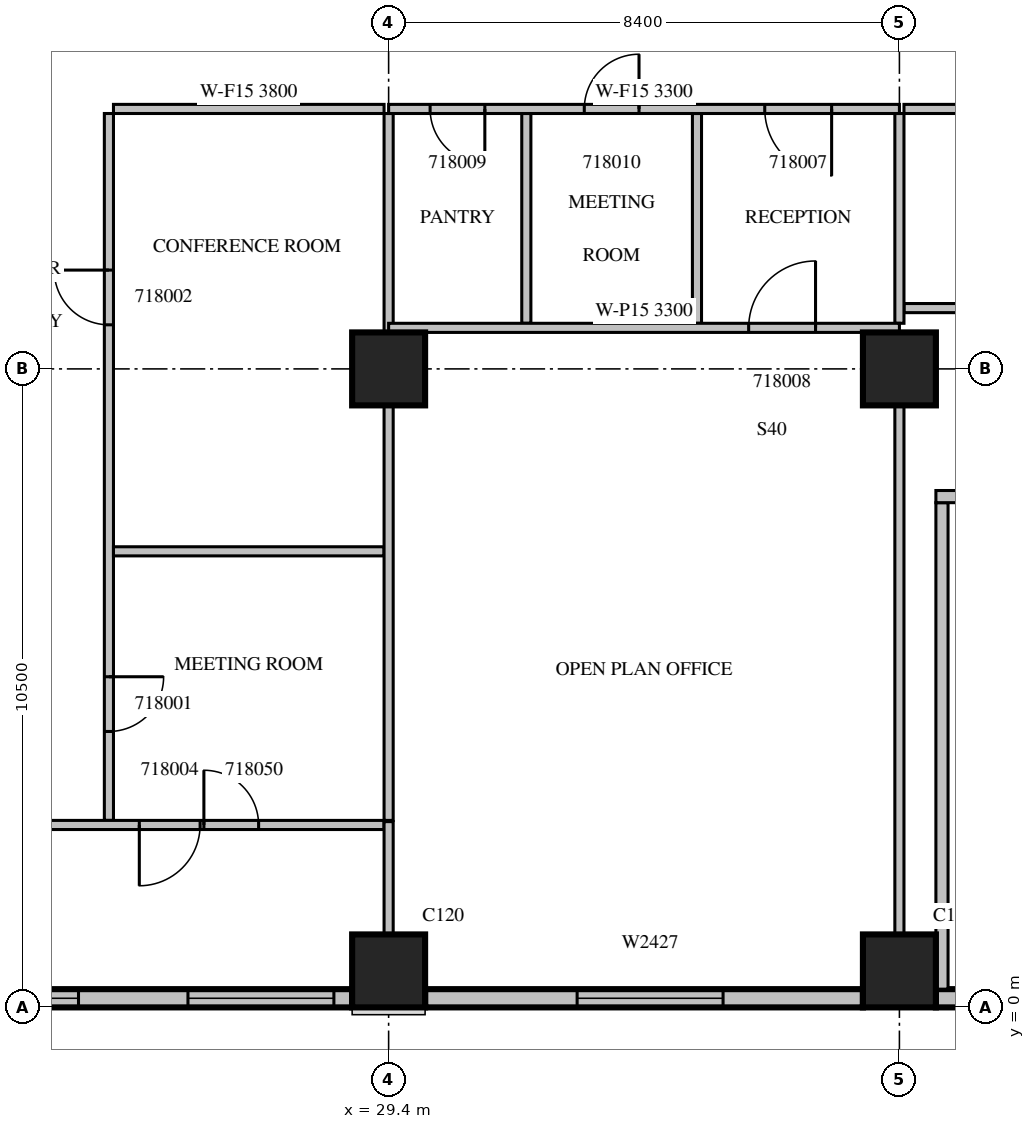
"""IFC4 building model, lengths in metres.
Left out: names, types, materials, properties, quantities, classifications, styles, units other than length and angle.
Written with IfcOpenShell. Run it as: python <this file> out.ifc"""

import sys

from ifc_helpers import new_model, si_unit, direction, frame, frame_2d, origin, origin_2d, place, context, subcontext, project, spatial, rectangle, extrude, source, transform, mapped, element, fill, save


model = new_model("IFC4")
c1 = context("Model", 3, precision=1e-05, world=origin(), true_north=direction((0.0, 1.0)))
c2 = subcontext(c1, "Body", "Model", "MODEL_VIEW")
j1 = project(units=[si_unit("LENGTHUNIT", "METRE"), si_unit("PLANEANGLEUNIT", "RADIAN")], contexts=[c1])
p1 = place(None, origin())
s1 = spatial("IfcSite", under=j1, at=p1, CompositionType="ELEMENT")
p2 = place(p1, origin())
s2 = spatial("IfcBuilding", under=s1, at=p2, CompositionType="ELEMENT")
p3 = place(p2, frame((0.0, 0.0, 86.7)))
s3 = spatial("IfcBuildingStorey", under=s2, at=p3, CompositionType="ELEMENT", Elevation=86.7)
m1 = source(origin(), c2, "Body", "SweptSolid", [
    extrude(rectangle(XDim=1.2, YDim=1.2, at=origin_2d()), origin(), (0.0, 0.0, 1.0), 4.2),
])
for number, where, z_axis, x_axis in (
    (1, (29.4, 0.6, 0.0), (0.0, 0.0, 1.0), (1.0, 0.0, 0.0)),
    (2, (37.8, 0.6, 0.0), (0.0, 0.0, 1.0), (1.0, 0.0, 0.0)),
    (3, (29.4, 10.5, 0.0), (0.0, 0.0, 1.0), (1.0, 0.0, 0.0)),
    (4, (37.8, 10.5, 0.0), (0.0, 0.0, 1.0), (1.0, 0.0, 0.0)),
):
    element("IfcColumn", number, at=place(p3, frame(where, z_axis=z_axis, x_axis=x_axis)), inside=s3, PredefinedType="COLUMN", context=c2, shape_type="MappedRepresentation", body=[
        mapped(m1, transform((0.0, 0.0, 0.0), scale=1.0)),
    ])
m2 = source(origin(), c2, "Body", "SweptSolid", [
    extrude(rectangle(XDim=7.2, YDim=0.3, at=frame_2d((3.6, 0.0))), origin(), (0.0, 0.0, 1.0), 3.8),
])
p4 = place(p3, frame((21.6, 0.15, 0.0), z_axis=(0.0, 0.0, 1.0), x_axis=(1.0, 0.0, 0.0)))
e5 = element("IfcWall", 5, at=p4, inside=s3, PredefinedType="STANDARD", context=c2, shape_type="MappedRepresentation", body=[
    mapped(m2, transform((0.0, 0.0, 0.0), scale=1.0)),
])
m3 = source(origin(), c2, "Body", "SweptSolid", [
    extrude(rectangle(XDim=2.4, YDim=2.7, at=frame_2d((1.2, 1.35))), frame((0.0, 0.16, 0.0), z_axis=(0.0, -1.0, 0.0), x_axis=(1.0, 0.0, 0.0)), (0.0, 0.0, 1.0), 0.32),
])
p5 = place(p4, frame((0.3, 0.0, 0.6)))
e6 = element("IfcOpeningElement", 6, at=p5, cuts=e5, PredefinedType="OPENING", context=c2, shape_type="MappedRepresentation", body=[
    mapped(m3, transform((0.0, 0.0, 0.0), scale=1.0)),
])
p6 = place(p4, frame((4.5, 0.0, 0.6)))
e7 = element("IfcOpeningElement", 7, at=p6, cuts=e5, PredefinedType="OPENING", context=c2, shape_type="MappedRepresentation", body=[
    mapped(m3, transform((0.0, 0.0, 0.0), scale=1.0)),
])
p7 = place(p3, frame((30.0, 0.15, 0.0), z_axis=(0.0, 0.0, 1.0), x_axis=(1.0, 0.0, 0.0)))
e8 = element("IfcWall", 8, at=p7, inside=s3, PredefinedType="STANDARD", context=c2, shape_type="MappedRepresentation", body=[
    mapped(m2, transform((0.0, 0.0, 0.0), scale=1.0)),
])
p8 = place(p7, frame((2.5, 0.0, 0.6)))
e9 = element("IfcOpeningElement", 9, at=p8, cuts=e8, PredefinedType="OPENING", context=c2, shape_type="MappedRepresentation", body=[
    mapped(m3, transform((0.0, 0.0, 0.0), scale=1.0)),
])
m4 = source(origin(), c2, "Body", "SweptSolid", [
    extrude(rectangle(XDim=1.8, YDim=0.3, at=frame_2d((0.9, 0.0))), origin(), (0.0, 0.0, 1.0), 3.8),
])
p9 = place(p3, frame((38.4, 0.15, 0.0), z_axis=(0.0, 0.0, 1.0), x_axis=(1.0, 0.0, 0.0)))
e10 = element("IfcWall", 10, at=p9, inside=s3, PredefinedType="STANDARD", context=c2, shape_type="MappedRepresentation", body=[
    mapped(m4, transform((0.0, 0.0, 0.0), scale=1.0)),
])
m5 = source(origin(), c2, "Body", "SweptSolid", [
    extrude(rectangle(XDim=8.0, YDim=0.2, at=frame_2d((4.0, 0.0))), origin(), (0.0, 0.0, 1.0), 3.8),
])
p10 = place(p3, frame((38.5, 0.3, 0.0), z_axis=(0.0, 0.0, 1.0), x_axis=(0.0, 1.0, 0.0)))
e11 = element("IfcWall", 11, at=p10, inside=s3, PredefinedType="PARTITIONING", context=c2, shape_type="MappedRepresentation", body=[
    mapped(m5, transform((0.0, 0.0, 0.0), scale=1.0)),
])
m6 = source(origin(), c2, "Body", "SweptSolid", [
    extrude(rectangle(XDim=5.45, YDim=0.2, at=frame_2d((2.725, 0.0))), origin(), (0.0, 0.0, 1.0), 3.8),
])
p11 = place(p3, frame((38.4, 8.4, 0.0), z_axis=(0.0, 0.0, 1.0), x_axis=(1.0, 0.0, 0.0)))
e12 = element("IfcWall", 12, at=p11, inside=s3, PredefinedType="PARTITIONING", context=c2, shape_type="MappedRepresentation", body=[
    mapped(m6, transform((0.0, 0.0, 0.0), scale=1.0)),
])
m7 = source(origin(), c2, "Body", "SweptSolid", [
    extrude(rectangle(XDim=1.2, YDim=2.1, at=frame_2d((0.6, 1.05))), frame((0.0, 0.11, 0.0), z_axis=(0.0, -1.0, 0.0), x_axis=(1.0, 0.0, 0.0)), (0.0, 0.0, 1.0), 0.22),
])
p12 = place(p11, frame((0.4, 0.0, 0.0)))
e13 = element("IfcOpeningElement", 13, at=p12, cuts=e12, PredefinedType="OPENING", context=c2, shape_type="MappedRepresentation", body=[
    mapped(m7, transform((0.0, 0.0, 0.0), scale=1.0)),
])
m8 = source(origin(), c2, "Body", "SweptSolid", [
    extrude(rectangle(XDim=0.9, YDim=2.1, at=frame_2d((0.45, 1.05))), frame((0.0, 0.11, 0.0), z_axis=(0.0, -1.0, 0.0), x_axis=(1.0, 0.0, 0.0)), (0.0, 0.0, 1.0), 0.22),
])
p13 = place(p11, frame((3.25, 0.0, 0.0)))
e14 = element("IfcOpeningElement", 14, at=p13, cuts=e12, PredefinedType="OPENING", context=c2, shape_type="MappedRepresentation", body=[
    mapped(m8, transform((0.0, 0.0, 0.0), scale=1.0)),
])
m9 = source(origin(), c2, "Body", "SweptSolid", [
    extrude(rectangle(XDim=11.625, YDim=0.15, at=frame_2d((5.812, 0.0))), origin(), (0.0, 0.0, 1.0), 3.8),
])
p14 = place(p3, frame((24.8, 14.7, 0.0), z_axis=(0.0, 0.0, 1.0), x_axis=(0.0, -1.0, 0.0)))
e15 = element("IfcWall", 15, at=p14, inside=s3, PredefinedType="PARTITIONING", context=c2, shape_type="MappedRepresentation", body=[
    mapped(m9, transform((0.0, 0.0, 0.0), scale=1.0)),
])
m10 = source(origin(), c2, "Body", "SweptSolid", [
    extrude(rectangle(XDim=0.9, YDim=2.1, at=frame_2d((0.45, 1.05))), frame((0.0, 0.085, 0.0), z_axis=(0.0, -1.0, 0.0), x_axis=(1.0, 0.0, 0.0)), (0.0, 0.0, 1.0), 0.17),
])
p15 = place(p14, frame((9.262, 0.0, 0.0)))
e16 = element("IfcOpeningElement", 16, at=p15, cuts=e15, PredefinedType="OPENING", context=c2, shape_type="MappedRepresentation", body=[
    mapped(m10, transform((0.0, 0.0, 0.0), scale=1.0)),
])
p16 = place(p14, frame((2.575, 0.0, 0.0)))
e17 = element("IfcOpeningElement", 17, at=p16, cuts=e15, PredefinedType="OPENING", context=c2, shape_type="MappedRepresentation", body=[
    mapped(m10, transform((0.0, 0.0, 0.0), scale=1.0)),
])
m11 = source(origin(), c2, "Body", "SweptSolid", [
    extrude(rectangle(XDim=4.45, YDim=0.15, at=frame_2d((2.225, 0.0))), origin(), (0.0, 0.0, 1.0), 3.8),
])
for number, where, z_axis, x_axis in (
    (18, (29.325, 7.5, 0.0), (0.0, 0.0, 1.0), (-1.0, 0.0, 0.0)),
    (19, (29.325, 14.775, 0.0), (0.0, 0.0, 1.0), (-1.0, 0.0, 0.0)),
):
    element("IfcWall", number, at=place(p3, frame(where, z_axis=z_axis, x_axis=x_axis)), inside=s3, PredefinedType="PARTITIONING", context=c2, shape_type="MappedRepresentation", body=[
        mapped(m11, transform((0.0, 0.0, 0.0), scale=1.0)),
    ])
m12 = source(origin(), c2, "Body", "SweptSolid", [
    extrude(rectangle(XDim=6.826, YDim=0.15, at=frame_2d((3.413, 0.0))), origin(), (0.0, 0.0, 1.0), 3.8),
])
p17 = place(p3, frame((29.4, 3.075, 0.0), z_axis=(0.0, 0.0, 1.0), x_axis=(0.0, 1.0, 0.0)))
e20 = element("IfcWall", 20, at=p17, inside=s3, PredefinedType="PARTITIONING", context=c2, shape_type="MappedRepresentation", body=[
    mapped(m12, transform((0.0, 0.0, 0.0), scale=1.0)),
])
m13 = source(origin(), c2, "Body", "SweptSolid", [
    extrude(rectangle(XDim=3.601, YDim=0.15, at=frame_2d((1.8, 0.0))), origin(), (0.0, 0.0, 1.0), 3.8),
])
p18 = place(p3, frame((29.4, 11.099, 0.0), z_axis=(0.0, 0.0, 1.0), x_axis=(0.0, 1.0, 0.0)))
e21 = element("IfcWall", 21, at=p18, inside=s3, PredefinedType="PARTITIONING", context=c2, shape_type="MappedRepresentation", body=[
    mapped(m13, transform((0.0, 0.0, 0.0), scale=1.0)),
])
m14 = source(origin(), c2, "Body", "SweptSolid", [
    extrude(rectangle(XDim=7.125, YDim=0.15, at=frame_2d((3.562, 0.0))), origin(), (0.0, 0.0, 1.0), 3.8),
])
p19 = place(p3, frame((22.2, 3.0, 0.0), z_axis=(0.0, 0.0, 1.0), x_axis=(1.0, 0.0, 0.0)))
e22 = element("IfcWall", 22, at=p19, inside=s3, PredefinedType="PARTITIONING", context=c2, shape_type="MappedRepresentation", body=[
    mapped(m14, transform((0.0, 0.0, 0.0), scale=1.0)),
])
m15 = source(origin(), c2, "Body", "SweptSolid", [
    extrude(rectangle(XDim=1.0, YDim=2.1, at=frame_2d((0.5, 1.05))), frame((0.0, 0.085, 0.0), z_axis=(0.0, -1.0, 0.0), x_axis=(1.0, 0.0, 0.0)), (0.0, 0.0, 1.0), 0.17),
])
p20 = place(p19, frame((3.1, 0.0, 0.0)))
e23 = element("IfcOpeningElement", 23, at=p20, cuts=e22, PredefinedType="OPENING", context=c2, shape_type="MappedRepresentation", body=[
    mapped(m15, transform((0.0, 0.0, 0.0), scale=1.0)),
])
p21 = place(p19, frame((4.162, 0.0, 0.0)))
e24 = element("IfcOpeningElement", 24, at=p21, cuts=e22, PredefinedType="OPENING", context=c2, shape_type="MappedRepresentation", body=[
    mapped(m10, transform((0.0, 0.0, 0.0), scale=1.0)),
])
m16 = source(origin(), c2, "Body", "SweptSolid", [
    extrude(rectangle(XDim=6.45, YDim=0.15, at=frame_2d((3.225, 0.0))), origin(), (0.0, 0.0, 1.0), 3.8),
])
p22 = place(p3, frame((37.875, 11.5, 0.0), z_axis=(0.0, 0.0, 1.0), x_axis=(1.0, 0.0, 0.0)))
e25 = element("IfcWall", 25, at=p22, inside=s3, PredefinedType="PARTITIONING", context=c2, shape_type="MappedRepresentation", body=[
    mapped(m16, transform((0.0, 0.0, 0.0), scale=1.0)),
])
p23 = place(p3, frame((44.325, 14.775, 0.0), z_axis=(0.0, 0.0, 1.0), x_axis=(-1.0, 0.0, 0.0)))
e26 = element("IfcWall", 26, at=p23, inside=s3, PredefinedType="PARTITIONING", context=c2, shape_type="MappedRepresentation", body=[
    mapped(m16, transform((0.0, 0.0, 0.0), scale=1.0)),
])
p24 = place(p23, frame((2.812, 0.0, 0.0)))
e27 = element("IfcOpeningElement", 27, at=p24, cuts=e26, PredefinedType="OPENING", context=c2, shape_type="MappedRepresentation", body=[
    mapped(m10, transform((0.0, 0.0, 0.0), scale=1.0)),
])
m17 = source(origin(), c2, "Body", "SweptSolid", [
    extrude(rectangle(XDim=3.45, YDim=0.15, at=frame_2d((1.725, 0.0))), origin(), (0.0, 0.0, 1.0), 3.8),
])
for number, where, z_axis, x_axis in (
    (28, (31.665, 11.25, 0.0), (0.0, 0.0, 1.0), (0.0, 1.0, 0.0)),
    (29, (34.471, 11.25, 0.0), (0.0, 0.0, 1.0), (0.0, 1.0, 0.0)),
):
    element("IfcWall", number, at=place(p3, frame(where, z_axis=z_axis, x_axis=x_axis)), inside=s3, PredefinedType="PARTITIONING", context=c2, shape_type="MappedRepresentation", body=[
        mapped(m17, transform((0.0, 0.0, 0.0), scale=1.0)),
    ])
m18 = source(origin(), c2, "Body", "SweptSolid", [
    extrude(rectangle(XDim=1.856, YDim=0.15, at=frame_2d((0.928, 0.0))), origin(), (0.0, 0.0, 1.0), 3.8),
])
p25 = place(p3, frame((29.4, 1.199, 0.0), z_axis=(0.0, 0.0, 1.0), x_axis=(0.0, 1.0, 0.0)))
e30 = element("IfcWall", 30, at=p25, inside=s3, PredefinedType="PARTITIONING", context=c2, shape_type="MappedRepresentation", body=[
    mapped(m18, transform((0.0, 0.0, 0.0), scale=1.0)),
])
m19 = source(origin(), c2, "Body", "SweptSolid", [
    extrude(rectangle(XDim=8.702, YDim=0.15, at=frame_2d((4.351, 0.0))), origin(), (0.0, 0.0, 1.0), 3.8),
])
p26 = place(p3, frame((37.8, 1.199, 0.0), z_axis=(0.0, 0.0, 1.0), x_axis=(0.0, 1.0, 0.0)))
e31 = element("IfcWall", 31, at=p26, inside=s3, PredefinedType="PARTITIONING", context=c2, shape_type="MappedRepresentation", body=[
    mapped(m19, transform((0.0, 0.0, 0.0), scale=1.0)),
])
p27 = place(p3, frame((37.8, 11.25, 0.0), z_axis=(0.0, 0.0, 1.0), x_axis=(0.0, 1.0, 0.0)))
e32 = element("IfcWall", 32, at=p27, inside=s3, PredefinedType="PARTITIONING", context=c2, shape_type="MappedRepresentation", body=[
    mapped(m17, transform((0.0, 0.0, 0.0), scale=1.0)),
])
m20 = source(origin(), c2, "Body", "SweptSolid", [
    extrude(rectangle(XDim=8.4, YDim=0.15, at=frame_2d((4.2, 0.0))), origin(), (0.0, 0.0, 1.0), 3.3),
])
p28 = place(p3, frame((37.8, 11.175, 0.0), z_axis=(0.0, 0.0, 1.0), x_axis=(-1.0, 0.0, 0.0)))
e33 = element("IfcWall", 33, at=p28, inside=s3, PredefinedType="PARTITIONING", context=c2, shape_type="MappedRepresentation", body=[
    mapped(m20, transform((0.0, 0.0, 0.0), scale=1.0)),
])
m21 = source(origin(), c2, "Body", "SweptSolid", [
    extrude(rectangle(XDim=1.1, YDim=2.1, at=frame_2d((0.55, 1.05))), frame((0.0, 0.085, 0.0), z_axis=(0.0, -1.0, 0.0), x_axis=(1.0, 0.0, 0.0)), (0.0, 0.0, 1.0), 0.17),
])
p29 = place(p28, frame((1.379, 0.0, 0.0)))
e34 = element("IfcOpeningElement", 34, at=p29, cuts=e33, PredefinedType="OPENING", context=c2, shape_type="MappedRepresentation", body=[
    mapped(m21, transform((0.0, 0.0, 0.0), scale=1.0)),
])
p30 = place(p3, frame((37.8, 14.775, 0.0), z_axis=(0.0, 0.0, 1.0), x_axis=(-1.0, 0.0, 0.0)))
e35 = element("IfcWall", 35, at=p30, inside=s3, PredefinedType="PARTITIONING", context=c2, shape_type="MappedRepresentation", body=[
    mapped(m20, transform((0.0, 0.0, 0.0), scale=1.0)),
])
p31 = place(p30, frame((1.115, 0.0, 0.0)))
e36 = element("IfcOpeningElement", 36, at=p31, cuts=e35, PredefinedType="OPENING", context=c2, shape_type="MappedRepresentation", body=[
    mapped(m21, transform((0.0, 0.0, 0.0), scale=1.0)),
])
p32 = place(p30, frame((6.818, 0.0, 0.0)))
e37 = element("IfcOpeningElement", 37, at=p32, cuts=e35, PredefinedType="OPENING", context=c2, shape_type="MappedRepresentation", body=[
    mapped(m10, transform((0.0, 0.0, 0.0), scale=1.0)),
])
p33 = place(p30, frame((4.282, 0.0, 0.0)))
e38 = element("IfcOpeningElement", 38, at=p33, cuts=e35, PredefinedType="OPENING", context=c2, shape_type="MappedRepresentation", body=[
    mapped(m10, transform((0.0, 0.0, 0.0), scale=1.0)),
])
m22 = source(origin(), c2, "Body", "SweptSolid", [
    extrude(rectangle(XDim=2.4, YDim=2.7, at=frame_2d((1.2, 1.35))), frame((0.0, 0.03, 0.0), z_axis=(0.0, -1.0, 0.0), x_axis=(1.0, 0.0, 0.0)), (0.0, 0.0, 1.0), 0.06),
])
p34 = place(p5, origin())
e39 = element("IfcWindow", 39, at=p34, inside=s3, PartitioningType="SINGLE_PANEL", PredefinedType="WINDOW", context=c2, shape_type="MappedRepresentation", body=[
    mapped(m22, transform((0.0, 0.0, 0.0), scale=1.0)),
])
fill(e6, e39)
p35 = place(p6, origin())
e40 = element("IfcWindow", 40, at=p35, inside=s3, PartitioningType="SINGLE_PANEL", PredefinedType="WINDOW", context=c2, shape_type="MappedRepresentation", body=[
    mapped(m22, transform((0.0, 0.0, 0.0), scale=1.0)),
])
fill(e7, e40)
p36 = place(p8, origin())
e41 = element("IfcWindow", 41, at=p36, inside=s3, PartitioningType="SINGLE_PANEL", PredefinedType="WINDOW", context=c2, shape_type="MappedRepresentation", body=[
    mapped(m22, transform((0.0, 0.0, 0.0), scale=1.0)),
])
fill(e9, e41)
m23 = source(origin(), c2, "Body", "SweptSolid", [
    extrude(rectangle(XDim=0.9, YDim=2.1, at=frame_2d((0.45, 1.05))), frame((0.0, 0.025, 0.0), z_axis=(0.0, -1.0, 0.0), x_axis=(1.0, 0.0, 0.0)), (0.0, 0.0, 1.0), 0.05),
])
p37 = place(p15, origin())
e42 = element("IfcDoor", 42, at=p37, inside=s3, OperationType="SINGLE_SWING_LEFT", PredefinedType="DOOR", context=c2, shape_type="MappedRepresentation", body=[
    mapped(m23, transform((0.0, 0.0, 0.0), scale=1.0)),
])
fill(e16, e42)
p38 = place(p16, origin())
e43 = element("IfcDoor", 43, at=p38, inside=s3, OperationType="SINGLE_SWING_RIGHT", PredefinedType="DOOR", context=c2, shape_type="MappedRepresentation", body=[
    mapped(m23, transform((0.0, 0.0, 0.0), scale=1.0)),
])
fill(e17, e43)
m24 = source(origin(), c2, "Body", "SweptSolid", [
    extrude(rectangle(XDim=1.0, YDim=2.1, at=frame_2d((0.5, 1.05))), frame((0.0, 0.025, 0.0), z_axis=(0.0, -1.0, 0.0), x_axis=(1.0, 0.0, 0.0)), (0.0, 0.0, 1.0), 0.05),
])
p39 = place(p20, origin())
e44 = element("IfcDoor", 44, at=p39, inside=s3, OperationType="SINGLE_SWING_RIGHT", PredefinedType="DOOR", context=c2, shape_type="MappedRepresentation", body=[
    mapped(m24, transform((0.0, 0.0, 0.0), scale=1.0)),
])
fill(e23, e44)
m25 = source(origin(), c2, "Body", "SweptSolid", [
    extrude(rectangle(XDim=1.1, YDim=2.1, at=frame_2d((0.55, 1.05))), frame((0.0, 0.025, 0.0), z_axis=(0.0, -1.0, 0.0), x_axis=(1.0, 0.0, 0.0)), (0.0, 0.0, 1.0), 0.05),
])
p40 = place(p31, origin())
e45 = element("IfcDoor", 45, at=p40, inside=s3, OperationType="SINGLE_SWING_LEFT", PredefinedType="DOOR", context=c2, shape_type="MappedRepresentation", body=[
    mapped(m25, transform((0.0, 0.0, 0.0), scale=1.0)),
])
fill(e36, e45)
p41 = place(p29, origin())
e46 = element("IfcDoor", 46, at=p41, inside=s3, OperationType="SINGLE_SWING_RIGHT", PredefinedType="DOOR", context=c2, shape_type="MappedRepresentation", body=[
    mapped(m25, transform((0.0, 0.0, 0.0), scale=1.0)),
])
fill(e34, e46)
p42 = place(p32, origin())
e47 = element("IfcDoor", 47, at=p42, inside=s3, OperationType="SINGLE_SWING_LEFT", PredefinedType="DOOR", context=c2, shape_type="MappedRepresentation", body=[
    mapped(m23, transform((0.0, 0.0, 0.0), scale=1.0)),
])
fill(e37, e47)
p43 = place(p33, origin())
e48 = element("IfcDoor", 48, at=p43, inside=s3, OperationType="SINGLE_SWING_RIGHT", PredefinedType="DOOR", context=c2, shape_type="MappedRepresentation", body=[
    mapped(m23, transform((0.0, 0.0, 0.0), scale=1.0)),
])
fill(e38, e48)
p44 = place(p21, origin())
e49 = element("IfcDoor", 49, at=p44, inside=s3, OperationType="SINGLE_SWING_LEFT", PredefinedType="DOOR", context=c2, shape_type="MappedRepresentation", body=[
    mapped(m23, transform((0.0, 0.0, 0.0), scale=1.0)),
])
fill(e24, e49)
save(model, sys.argv[1])
